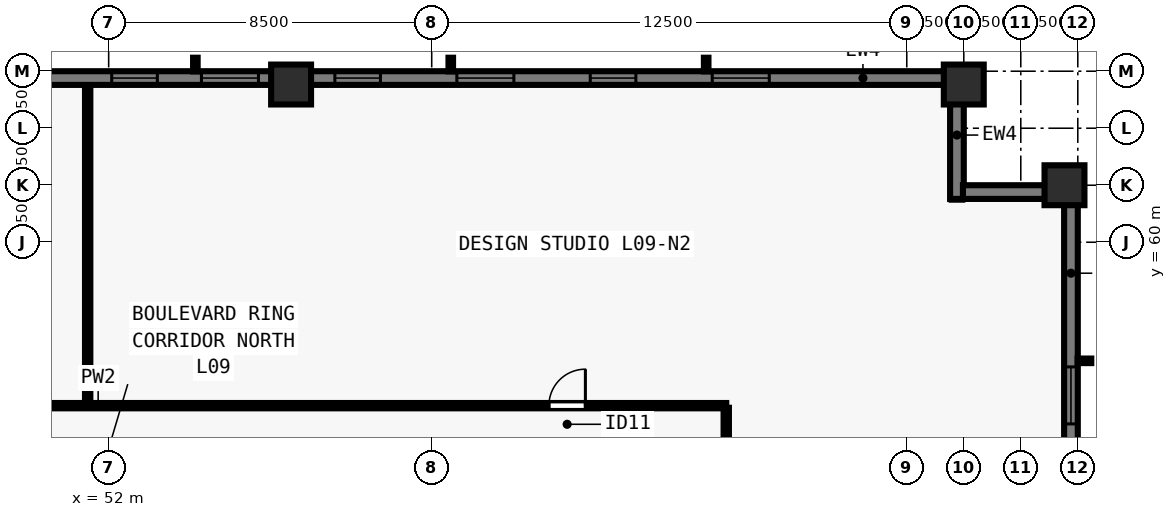
"""IFC4 building model, lengths in metres.
Left out: names, types, materials, properties, quantities, classifications, styles, units other than length and angle.
Written with IfcOpenShell. Run it as: python <this file> out.ifc"""

import sys

from ifc_helpers import new_model, si_unit, direction, frame, frame_2d, origin, origin_2d, place, context, subcontext, project, spatial, rectangle, extrude, element, fill, save


model = new_model("IFC4")
c1 = context("Model", 3, precision=1e-05, world=origin(), true_north=direction((0.0, 1.0)))
c2 = subcontext(c1, "Body", "Model", "MODEL_VIEW")
j1 = project(units=[si_unit("LENGTHUNIT", "METRE"), si_unit("PLANEANGLEUNIT", "RADIAN")], contexts=[c1])
p1 = place(None, origin())
s1 = spatial("IfcSite", under=j1, at=p1, CompositionType="ELEMENT")
p2 = place(p1, origin())
s2 = spatial("IfcBuilding", under=s1, at=p2, CompositionType="ELEMENT")
p3 = place(p2, frame((0.0, 0.0, 37.5)))
s3 = spatial("IfcBuildingStorey", under=s2, at=p3, CompositionType="ELEMENT", Elevation=37.5)
for number, where, z_axis, x_axis in (
    (1, (77.15, 61.5, 0.0), (0.0, 0.0, 1.0), (0.0, 1.0, 0.0)),
    (2, (74.5, 64.15, 0.0), (0.0, 0.0, 1.0), (1.0, 0.0, 0.0)),
    (3, (56.8, 64.15, 0.0), (0.0, 0.0, 1.0), (1.0, 0.0, 0.0)),
):
    element("IfcColumn", number, at=place(p3, frame(where, z_axis=z_axis, x_axis=x_axis)), inside=s3, PredefinedType="COLUMN", context=c2, shape_type="SweptSolid", body=[
        extrude(rectangle(XDim=1.05, YDim=1.05, at=origin_2d()), origin(), (0.0, 0.0, 1.0), 3.5),
    ])
p4 = place(p3, frame((29.5, 64.32, 0.0), z_axis=(0.0, 0.0, 1.0), x_axis=(1.0, 0.0, 0.0)))
e4 = element("IfcWall", 4, at=p4, inside=s3, PredefinedType="SOLIDWALL", context=c2, shape_type="SweptSolid", body=[
    extrude(rectangle(XDim=44.662, YDim=0.36, at=frame_2d((22.331, 0.0))), origin(), (0.0, 0.0, 1.0), 3.28),
])
p5 = place(p4, frame((4.78, 0.0, 0.8)))
e5 = element("IfcOpeningElement", 5, at=p5, cuts=e4, PredefinedType="OPENING", context=c2, shape_type="SweptSolid", body=[
    extrude(rectangle(XDim=1.5, YDim=1.544, at=frame_2d((0.75, 0.772))), frame((0.0, 0.19, 0.0), z_axis=(0.0, -1.0, 0.0), x_axis=(1.0, 0.0, 0.0)), (0.0, 0.0, 1.0), 0.38),
])
p6 = place(p4, frame((8.29, 0.0, 0.8)))
e6 = element("IfcOpeningElement", 6, at=p6, cuts=e4, PredefinedType="OPENING", context=c2, shape_type="SweptSolid", body=[
    extrude(rectangle(XDim=1.2, YDim=1.544, at=frame_2d((0.6, 0.772))), frame((0.0, 0.19, 0.0), z_axis=(0.0, -1.0, 0.0), x_axis=(1.0, 0.0, 0.0)), (0.0, 0.0, 1.0), 0.38),
])
p7 = place(p4, frame((11.5, 0.0, 0.8)))
e7 = element("IfcOpeningElement", 7, at=p7, cuts=e4, PredefinedType="OPENING", context=c2, shape_type="SweptSolid", body=[
    extrude(rectangle(XDim=1.5, YDim=1.544, at=frame_2d((0.75, 0.772))), frame((0.0, 0.19, 0.0), z_axis=(0.0, -1.0, 0.0), x_axis=(1.0, 0.0, 0.0)), (0.0, 0.0, 1.0), 0.38),
])
p8 = place(p4, frame((15.01, 0.0, 0.8)))
e8 = element("IfcOpeningElement", 8, at=p8, cuts=e4, PredefinedType="OPENING", context=c2, shape_type="SweptSolid", body=[
    extrude(rectangle(XDim=1.2, YDim=1.544, at=frame_2d((0.6, 0.772))), frame((0.0, 0.19, 0.0), z_axis=(0.0, -1.0, 0.0), x_axis=(1.0, 0.0, 0.0)), (0.0, 0.0, 1.0), 0.38),
])
p9 = place(p4, frame((18.671, 0.0, 0.8)))
e9 = element("IfcOpeningElement", 9, at=p9, cuts=e4, PredefinedType="OPENING", context=c2, shape_type="SweptSolid", body=[
    extrude(rectangle(XDim=1.5, YDim=1.544, at=frame_2d((0.75, 0.772))), frame((0.0, 0.19, 0.0), z_axis=(0.0, -1.0, 0.0), x_axis=(1.0, 0.0, 0.0)), (0.0, 0.0, 1.0), 0.38),
])
p10 = place(p4, frame((22.581, 0.0, 0.8)))
e10 = element("IfcOpeningElement", 10, at=p10, cuts=e4, PredefinedType="OPENING", context=c2, shape_type="SweptSolid", body=[
    extrude(rectangle(XDim=1.2, YDim=1.544, at=frame_2d((0.6, 0.772))), frame((0.0, 0.19, 0.0), z_axis=(0.0, -1.0, 0.0), x_axis=(1.0, 0.0, 0.0)), (0.0, 0.0, 1.0), 0.38),
])
p11 = place(p4, frame((24.941, 0.0, 0.8)))
e11 = element("IfcOpeningElement", 11, at=p11, cuts=e4, PredefinedType="OPENING", context=c2, shape_type="SweptSolid", body=[
    extrude(rectangle(XDim=1.5, YDim=1.544, at=frame_2d((0.75, 0.772))), frame((0.0, 0.19, 0.0), z_axis=(0.0, -1.0, 0.0), x_axis=(1.0, 0.0, 0.0)), (0.0, 0.0, 1.0), 0.38),
])
p12 = place(p4, frame((28.451, 0.0, 0.8)))
e12 = element("IfcOpeningElement", 12, at=p12, cuts=e4, PredefinedType="OPENING", context=c2, shape_type="SweptSolid", body=[
    extrude(rectangle(XDim=1.2, YDim=1.544, at=frame_2d((0.6, 0.772))), frame((0.0, 0.19, 0.0), z_axis=(0.0, -1.0, 0.0), x_axis=(1.0, 0.0, 0.0)), (0.0, 0.0, 1.0), 0.38),
])
p13 = place(p4, frame((31.662, 0.0, 0.8)))
e13 = element("IfcOpeningElement", 13, at=p13, cuts=e4, PredefinedType="OPENING", context=c2, shape_type="SweptSolid", body=[
    extrude(rectangle(XDim=1.5, YDim=1.544, at=frame_2d((0.75, 0.772))), frame((0.0, 0.19, 0.0), z_axis=(0.0, -1.0, 0.0), x_axis=(1.0, 0.0, 0.0)), (0.0, 0.0, 1.0), 0.38),
])
p14 = place(p4, frame((35.172, 0.0, 0.8)))
e14 = element("IfcOpeningElement", 14, at=p14, cuts=e4, PredefinedType="OPENING", context=c2, shape_type="SweptSolid", body=[
    extrude(rectangle(XDim=1.2, YDim=1.544, at=frame_2d((0.6, 0.772))), frame((0.0, 0.19, 0.0), z_axis=(0.0, -1.0, 0.0), x_axis=(1.0, 0.0, 0.0)), (0.0, 0.0, 1.0), 0.38),
])
p15 = place(p4, frame((38.382, 0.0, 0.8)))
e15 = element("IfcOpeningElement", 15, at=p15, cuts=e4, PredefinedType="OPENING", context=c2, shape_type="SweptSolid", body=[
    extrude(rectangle(XDim=1.5, YDim=1.544, at=frame_2d((0.75, 0.772))), frame((0.0, 0.19, 0.0), z_axis=(0.0, -1.0, 0.0), x_axis=(1.0, 0.0, 0.0)), (0.0, 0.0, 1.0), 0.38),
])
p16 = place(p3, frame((74.32, 64.5, 0.0), z_axis=(0.0, 0.0, 1.0), x_axis=(0.0, -1.0, 0.0)))
e16 = element("IfcWall", 16, at=p16, inside=s3, PredefinedType="SOLIDWALL", context=c2, shape_type="SweptSolid", body=[
    extrude(rectangle(XDim=3.36, YDim=0.36, at=frame_2d((1.68, 0.0))), origin(), (0.0, 0.0, 1.0), 3.28),
])
p17 = place(p3, frame((74.478, 61.32, 0.0), z_axis=(0.0, 0.0, 1.0), x_axis=(1.0, 0.0, 0.0)))
e17 = element("IfcWall", 17, at=p17, inside=s3, PredefinedType="SOLIDWALL", context=c2, shape_type="SweptSolid", body=[
    extrude(rectangle(XDim=2.684, YDim=0.36, at=frame_2d((1.342, 0.0))), origin(), (0.0, 0.0, 1.0), 3.28),
])
p18 = place(p3, frame((77.32, 61.5, 0.0), z_axis=(0.0, 0.0, 1.0), x_axis=(0.0, -1.0, 0.0)))
e18 = element("IfcWall", 18, at=p18, inside=s3, PredefinedType="SOLIDWALL", context=c2, shape_type="SweptSolid", body=[
    extrude(rectangle(XDim=44.662, YDim=0.36, at=frame_2d((22.331, 0.0))), origin(), (0.0, 0.0, 1.0), 3.28),
])
p19 = place(p18, frame((4.78, 0.0, 0.8)))
e19 = element("IfcOpeningElement", 19, at=p19, cuts=e18, PredefinedType="OPENING", context=c2, shape_type="SweptSolid", body=[
    extrude(rectangle(XDim=1.5, YDim=1.544, at=frame_2d((0.75, 0.772))), frame((0.0, 0.19, 0.0), z_axis=(0.0, -1.0, 0.0), x_axis=(1.0, 0.0, 0.0)), (0.0, 0.0, 1.0), 0.38),
])
p20 = place(p18, frame((8.29, 0.0, 0.8)))
e20 = element("IfcOpeningElement", 20, at=p20, cuts=e18, PredefinedType="OPENING", context=c2, shape_type="SweptSolid", body=[
    extrude(rectangle(XDim=1.2, YDim=1.544, at=frame_2d((0.6, 0.772))), frame((0.0, 0.19, 0.0), z_axis=(0.0, -1.0, 0.0), x_axis=(1.0, 0.0, 0.0)), (0.0, 0.0, 1.0), 0.38),
])
p21 = place(p18, frame((11.5, 0.0, 0.8)))
e21 = element("IfcOpeningElement", 21, at=p21, cuts=e18, PredefinedType="OPENING", context=c2, shape_type="SweptSolid", body=[
    extrude(rectangle(XDim=1.5, YDim=1.544, at=frame_2d((0.75, 0.772))), frame((0.0, 0.19, 0.0), z_axis=(0.0, -1.0, 0.0), x_axis=(1.0, 0.0, 0.0)), (0.0, 0.0, 1.0), 0.38),
])
p22 = place(p18, frame((15.01, 0.0, 0.8)))
e22 = element("IfcOpeningElement", 22, at=p22, cuts=e18, PredefinedType="OPENING", context=c2, shape_type="SweptSolid", body=[
    extrude(rectangle(XDim=1.2, YDim=1.544, at=frame_2d((0.6, 0.772))), frame((0.0, 0.19, 0.0), z_axis=(0.0, -1.0, 0.0), x_axis=(1.0, 0.0, 0.0)), (0.0, 0.0, 1.0), 0.38),
])
p23 = place(p18, frame((18.671, 0.0, 0.8)))
e23 = element("IfcOpeningElement", 23, at=p23, cuts=e18, PredefinedType="OPENING", context=c2, shape_type="SweptSolid", body=[
    extrude(rectangle(XDim=1.5, YDim=1.544, at=frame_2d((0.75, 0.772))), frame((0.0, 0.19, 0.0), z_axis=(0.0, -1.0, 0.0), x_axis=(1.0, 0.0, 0.0)), (0.0, 0.0, 1.0), 0.38),
])
p24 = place(p18, frame((22.581, 0.0, 0.8)))
e24 = element("IfcOpeningElement", 24, at=p24, cuts=e18, PredefinedType="OPENING", context=c2, shape_type="SweptSolid", body=[
    extrude(rectangle(XDim=1.2, YDim=1.544, at=frame_2d((0.6, 0.772))), frame((0.0, 0.19, 0.0), z_axis=(0.0, -1.0, 0.0), x_axis=(1.0, 0.0, 0.0)), (0.0, 0.0, 1.0), 0.38),
])
p25 = place(p18, frame((24.941, 0.0, 0.8)))
e25 = element("IfcOpeningElement", 25, at=p25, cuts=e18, PredefinedType="OPENING", context=c2, shape_type="SweptSolid", body=[
    extrude(rectangle(XDim=1.5, YDim=1.544, at=frame_2d((0.75, 0.772))), frame((0.0, 0.19, 0.0), z_axis=(0.0, -1.0, 0.0), x_axis=(1.0, 0.0, 0.0)), (0.0, 0.0, 1.0), 0.38),
])
p26 = place(p18, frame((28.451, 0.0, 0.8)))
e26 = element("IfcOpeningElement", 26, at=p26, cuts=e18, PredefinedType="OPENING", context=c2, shape_type="SweptSolid", body=[
    extrude(rectangle(XDim=1.2, YDim=1.544, at=frame_2d((0.6, 0.772))), frame((0.0, 0.19, 0.0), z_axis=(0.0, -1.0, 0.0), x_axis=(1.0, 0.0, 0.0)), (0.0, 0.0, 1.0), 0.38),
])
p27 = place(p18, frame((31.662, 0.0, 0.8)))
e27 = element("IfcOpeningElement", 27, at=p27, cuts=e18, PredefinedType="OPENING", context=c2, shape_type="SweptSolid", body=[
    extrude(rectangle(XDim=1.5, YDim=1.544, at=frame_2d((0.75, 0.772))), frame((0.0, 0.19, 0.0), z_axis=(0.0, -1.0, 0.0), x_axis=(1.0, 0.0, 0.0)), (0.0, 0.0, 1.0), 0.38),
])
p28 = place(p18, frame((35.172, 0.0, 0.8)))
e28 = element("IfcOpeningElement", 28, at=p28, cuts=e18, PredefinedType="OPENING", context=c2, shape_type="SweptSolid", body=[
    extrude(rectangle(XDim=1.2, YDim=1.544, at=frame_2d((0.6, 0.772))), frame((0.0, 0.19, 0.0), z_axis=(0.0, -1.0, 0.0), x_axis=(1.0, 0.0, 0.0)), (0.0, 0.0, 1.0), 0.38),
])
p29 = place(p18, frame((38.382, 0.0, 0.8)))
e29 = element("IfcOpeningElement", 29, at=p29, cuts=e18, PredefinedType="OPENING", context=c2, shape_type="SweptSolid", body=[
    extrude(rectangle(XDim=1.5, YDim=1.544, at=frame_2d((0.75, 0.772))), frame((0.0, 0.19, 0.0), z_axis=(0.0, -1.0, 0.0), x_axis=(1.0, 0.0, 0.0)), (0.0, 0.0, 1.0), 0.38),
])
p30 = place(p3, frame((35.75, 55.7, 0.0), z_axis=(0.0, 0.0, 1.0), x_axis=(1.0, 0.0, 0.0)))
e30 = element("IfcWall", 30, at=p30, inside=s3, PredefinedType="PARTITIONING", context=c2, shape_type="SweptSolid", body=[
    extrude(rectangle(XDim=32.5, YDim=0.14, at=frame_2d((16.25, 0.0))), origin(), (0.0, 0.0, 1.0), 3.28),
])
p31 = place(p30, frame((3.154, 0.0, 0.0)))
e31 = element("IfcOpeningElement", 31, at=p31, cuts=e30, PredefinedType="OPENING", context=c2, shape_type="SweptSolid", body=[
    extrude(rectangle(XDim=0.96, YDim=2.12, at=frame_2d((0.48, 1.06))), frame((0.0, 0.08, 0.0), z_axis=(0.0, -1.0, 0.0), x_axis=(1.0, 0.0, 0.0)), (0.0, 0.0, 1.0), 0.16),
])
p32 = place(p30, frame((27.834, 0.0, 0.0)))
e32 = element("IfcOpeningElement", 32, at=p32, cuts=e30, PredefinedType="OPENING", context=c2, shape_type="SweptSolid", body=[
    extrude(rectangle(XDim=0.96, YDim=2.12, at=frame_2d((0.48, 1.06))), frame((0.0, 0.08, 0.0), z_axis=(0.0, -1.0, 0.0), x_axis=(1.0, 0.0, 0.0)), (0.0, 0.0, 1.0), 0.16),
])
p33 = place(p3, frame((68.25, 22.355, 0.0), z_axis=(0.0, 0.0, 1.0), x_axis=(0.0, 1.0, 0.0)))
e33 = element("IfcWall", 33, at=p33, inside=s3, PredefinedType="PARTITIONING", context=c2, shape_type="SweptSolid", body=[
    extrude(rectangle(XDim=33.29, YDim=0.14, at=frame_2d((16.645, 0.0))), origin(), (0.0, 0.0, 1.0), 3.28),
])
p34 = place(p33, frame((3.522, 0.0, 0.0)))
e34 = element("IfcOpeningElement", 34, at=p34, cuts=e33, PredefinedType="OPENING", context=c2, shape_type="SweptSolid", body=[
    extrude(rectangle(XDim=0.96, YDim=2.12, at=frame_2d((0.48, 1.06))), frame((0.0, 0.08, 0.0), z_axis=(0.0, -1.0, 0.0), x_axis=(1.0, 0.0, 0.0)), (0.0, 0.0, 1.0), 0.16),
])
p35 = place(p33, frame((11.956, 0.0, 0.0)))
e35 = element("IfcOpeningElement", 35, at=p35, cuts=e33, PredefinedType="OPENING", context=c2, shape_type="SweptSolid", body=[
    extrude(rectangle(XDim=0.96, YDim=2.12, at=frame_2d((0.48, 1.06))), frame((0.0, 0.08, 0.0), z_axis=(0.0, -1.0, 0.0), x_axis=(1.0, 0.0, 0.0)), (0.0, 0.0, 1.0), 0.16),
])
p36 = place(p33, frame((20.256, 0.0, 0.0)))
e36 = element("IfcOpeningElement", 36, at=p36, cuts=e33, PredefinedType="OPENING", context=c2, shape_type="SweptSolid", body=[
    extrude(rectangle(XDim=0.96, YDim=2.12, at=frame_2d((0.48, 1.06))), frame((0.0, 0.08, 0.0), z_axis=(0.0, -1.0, 0.0), x_axis=(1.0, 0.0, 0.0)), (0.0, 0.0, 1.0), 0.16),
])
p37 = place(p33, frame((28.422, 0.0, 0.0)))
e37 = element("IfcOpeningElement", 37, at=p37, cuts=e33, PredefinedType="OPENING", context=c2, shape_type="SweptSolid", body=[
    extrude(rectangle(XDim=0.96, YDim=2.12, at=frame_2d((0.48, 1.06))), frame((0.0, 0.08, 0.0), z_axis=(0.0, -1.0, 0.0), x_axis=(1.0, 0.0, 0.0)), (0.0, 0.0, 1.0), 0.16),
])
p38 = place(p3, frame((51.448, 55.8, 0.0), z_axis=(0.0, 0.0, 1.0), x_axis=(0.0, 1.0, 0.0)))
e38 = element("IfcWall", 38, at=p38, inside=s3, PredefinedType="PARTITIONING", context=c2, shape_type="SweptSolid", body=[
    extrude(rectangle(XDim=8.28, YDim=0.14, at=frame_2d((4.14, 0.0))), origin(), (0.0, 0.0, 1.0), 3.28),
])
p39 = place(p10, origin())
e39 = element("IfcWindow", 39, at=p39, inside=s3, PartitioningType="SINGLE_PANEL", PredefinedType="WINDOW", context=c2, shape_type="SweptSolid", body=[
    extrude(rectangle(XDim=1.2, YDim=1.544, at=frame_2d((0.6, 0.772))), frame((0.0, -0.05, 0.0), z_axis=(0.0, -1.0, 0.0), x_axis=(1.0, 0.0, 0.0)), (0.0, 0.0, 1.0), 0.06),
])
fill(e10, e39)
p40 = place(p11, origin())
e40 = element("IfcWindow", 40, at=p40, inside=s3, PartitioningType="SINGLE_PANEL", PredefinedType="WINDOW", context=c2, shape_type="SweptSolid", body=[
    extrude(rectangle(XDim=1.5, YDim=1.544, at=frame_2d((0.75, 0.772))), frame((0.0, -0.05, 0.0), z_axis=(0.0, -1.0, 0.0), x_axis=(1.0, 0.0, 0.0)), (0.0, 0.0, 1.0), 0.06),
])
fill(e11, e40)
p41 = place(p12, origin())
e41 = element("IfcWindow", 41, at=p41, inside=s3, PartitioningType="SINGLE_PANEL", PredefinedType="WINDOW", context=c2, shape_type="SweptSolid", body=[
    extrude(rectangle(XDim=1.2, YDim=1.544, at=frame_2d((0.6, 0.772))), frame((0.0, -0.05, 0.0), z_axis=(0.0, -1.0, 0.0), x_axis=(1.0, 0.0, 0.0)), (0.0, 0.0, 1.0), 0.06),
])
fill(e12, e41)
p42 = place(p13, origin())
e42 = element("IfcWindow", 42, at=p42, inside=s3, PartitioningType="SINGLE_PANEL", PredefinedType="WINDOW", context=c2, shape_type="SweptSolid", body=[
    extrude(rectangle(XDim=1.5, YDim=1.544, at=frame_2d((0.75, 0.772))), frame((0.0, -0.05, 0.0), z_axis=(0.0, -1.0, 0.0), x_axis=(1.0, 0.0, 0.0)), (0.0, 0.0, 1.0), 0.06),
])
fill(e13, e42)
p43 = place(p14, origin())
e43 = element("IfcWindow", 43, at=p43, inside=s3, PartitioningType="SINGLE_PANEL", PredefinedType="WINDOW", context=c2, shape_type="SweptSolid", body=[
    extrude(rectangle(XDim=1.2, YDim=1.544, at=frame_2d((0.6, 0.772))), frame((0.0, -0.05, 0.0), z_axis=(0.0, -1.0, 0.0), x_axis=(1.0, 0.0, 0.0)), (0.0, 0.0, 1.0), 0.06),
])
fill(e14, e43)
p44 = place(p15, origin())
e44 = element("IfcWindow", 44, at=p44, inside=s3, PartitioningType="SINGLE_PANEL", PredefinedType="WINDOW", context=c2, shape_type="SweptSolid", body=[
    extrude(rectangle(XDim=1.5, YDim=1.544, at=frame_2d((0.75, 0.772))), frame((0.0, -0.05, 0.0), z_axis=(0.0, -1.0, 0.0), x_axis=(1.0, 0.0, 0.0)), (0.0, 0.0, 1.0), 0.06),
])
fill(e15, e44)
p45 = place(p19, origin())
e45 = element("IfcWindow", 45, at=p45, inside=s3, PartitioningType="SINGLE_PANEL", PredefinedType="WINDOW", context=c2, shape_type="SweptSolid", body=[
    extrude(rectangle(XDim=1.5, YDim=1.544, at=frame_2d((0.75, 0.772))), frame((0.0, -0.05, 0.0), z_axis=(0.0, -1.0, 0.0), x_axis=(1.0, 0.0, 0.0)), (0.0, 0.0, 1.0), 0.06),
])
fill(e19, e45)
p46 = place(p32, origin())
e46 = element("IfcDoor", 46, at=p46, inside=s3, OperationType="SINGLE_SWING_RIGHT", PredefinedType="DOOR", context=c2, shape_type="SweptSolid", body=[
    extrude(rectangle(XDim=0.96, YDim=2.12, at=frame_2d((0.48, 1.06))), frame((0.0, 0.025, 0.0), z_axis=(0.0, -1.0, 0.0), x_axis=(1.0, 0.0, 0.0)), (0.0, 0.0, 1.0), 0.05),
])
fill(e32, e46)
save(model, sys.argv[1])
